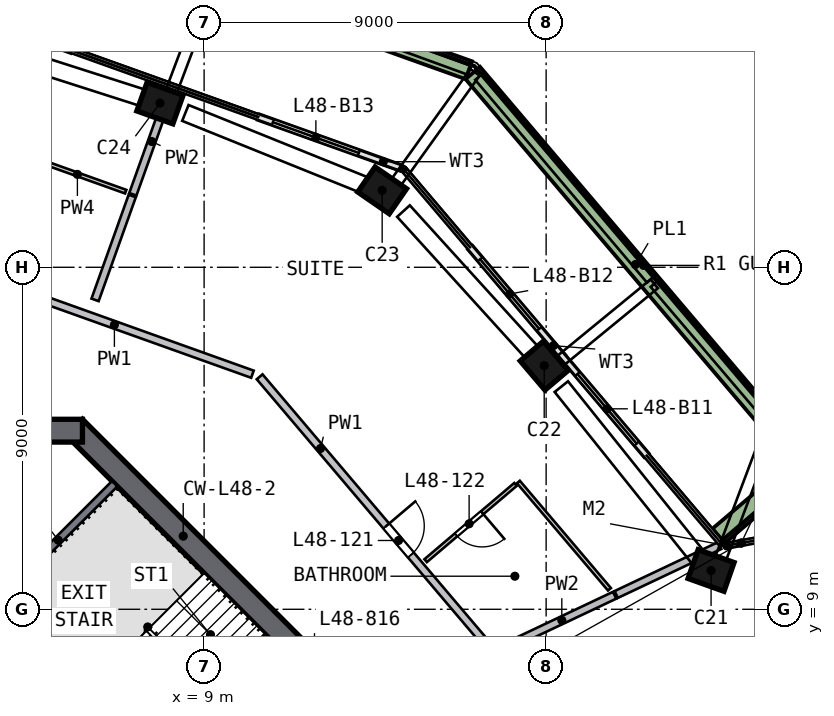
"""IFC4 building model, lengths in metres.
Left out: names, types, materials, properties, quantities, classifications, styles, units other than length and angle.
Written with IfcOpenShell. Run it as: python <this file> out.ifc"""

import sys

from ifc_helpers import new_model, si_unit, direction, frame, frame_2d, origin, origin_2d, place, context, subcontext, project, spatial, rectangle, extrude, element, fill, save


model = new_model("IFC4")
c1 = context("Model", 3, precision=1e-05, world=origin(), true_north=direction((0.0, 1.0)))
c2 = subcontext(c1, "Body", "Model", "MODEL_VIEW")
j1 = project(units=[si_unit("LENGTHUNIT", "METRE"), si_unit("PLANEANGLEUNIT", "RADIAN")], contexts=[c1])
p1 = place(None, origin())
s1 = spatial("IfcSite", under=j1, at=p1, CompositionType="ELEMENT")
p2 = place(p1, origin())
s2 = spatial("IfcBuilding", under=s1, at=p2, CompositionType="ELEMENT")
p3 = place(p2, frame((0.0, 0.0, 197.5)))
s3 = spatial("IfcBuildingStorey", under=s2, at=p3, CompositionType="ELEMENT", Elevation=197.5)
p4 = place(p3, frame((22.398, 9.893, 0.0), z_axis=(-0.047964708, 0.106115266, 0.993196324), x_axis=(0.940870573, -0.329039999, 0.080593079)))
e1 = element("IfcColumn", 1, at=p4, inside=s3, PredefinedType="COLUMN", context=c2, shape_type="SweptSolid", body=[
    extrude(rectangle(XDim=1.0, YDim=0.8, at=origin_2d()), origin(), (0.0, 0.0, 1.0), 3.212),
])
p5 = place(p3, frame((18.038, 15.308, 0.0), z_axis=(-0.073538813, 0.085174219, 0.993648527), x_axis=(-0.642958445, 0.757590083, -0.112524239)))
e2 = element("IfcColumn", 2, at=p5, inside=s3, PredefinedType="COLUMN", context=c2, shape_type="SweptSolid", body=[
    extrude(rectangle(XDim=1.0, YDim=0.8, at=origin_2d()), origin(), (0.0, 0.0, 1.0), 3.21),
])
p6 = place(p3, frame((13.801, 19.946, 0.0), z_axis=(-0.095410014, 0.064772376, 0.99332848), x_axis=(0.817069655, -0.56488901, 0.115315158)))
e3 = element("IfcColumn", 3, at=p6, inside=s3, PredefinedType="COLUMN", context=c2, shape_type="SweptSolid", body=[
    extrude(rectangle(XDim=1.0, YDim=0.8, at=origin_2d()), origin(), (0.0, 0.0, 1.0), 3.211),
])
p7 = place(p3, frame((7.967, 22.276, 0.0), z_axis=(-0.106239847, 0.037035652, 0.99365057), x_axis=(-0.935464206, 0.33503593, -0.112506199)))
e4 = element("IfcColumn", 4, at=p7, inside=s3, PredefinedType="COLUMN", context=c2, shape_type="SweptSolid", body=[
    extrude(rectangle(XDim=1.0, YDim=0.8, at=origin_2d()), origin(), (0.0, 0.0, 1.0), 3.21),
])
p8 = place(p3, frame((13.788, 5.587, 0.0), z_axis=(0.0, 0.0, 1.0), x_axis=(-0.707106781, 0.707106781, 0.0)))
e5 = element("IfcWall", 5, at=p8, inside=s3, PredefinedType="SHEAR", context=c2, shape_type="SweptSolid", body=[
    extrude(rectangle(XDim=11.598, YDim=0.6, at=frame_2d((5.799, 0.0))), origin(), (0.0, 0.0, 1.0), 3.5),
])
p9 = place(p8, frame((2.099, 0.0, 0.0)))
e6 = element("IfcOpeningElement", 6, at=p9, cuts=e5, PredefinedType="OPENING", context=c2, shape_type="SweptSolid", body=[
    extrude(rectangle(XDim=1.2, YDim=2.1, at=frame_2d((0.6, 1.05))), frame((0.0, 0.31, 0.0), z_axis=(0.0, -1.0, 0.0), x_axis=(1.0, 0.0, 0.0)), (0.0, 0.0, 1.0), 0.62),
])
p10 = place(p3, frame((5.799, 13.7, 0.0), z_axis=(0.0, 0.0, 1.0), x_axis=(-1.0, 0.0, 0.0)))
e7 = element("IfcWall", 7, at=p10, inside=s3, PredefinedType="SHEAR", context=c2, shape_type="SweptSolid", body=[
    extrude(rectangle(XDim=11.598, YDim=0.6, at=frame_2d((5.799, 0.0))), origin(), (0.0, 0.0, 1.0), 3.5),
])
p11 = place(p10, frame((4.899, 0.0, 0.0)))
e8 = element("IfcOpeningElement", 8, at=p11, cuts=e7, PredefinedType="OPENING", context=c2, shape_type="SweptSolid", body=[
    extrude(rectangle(XDim=1.8, YDim=2.1, at=frame_2d((0.9, 1.05))), frame((0.0, 0.31, 0.0), z_axis=(0.0, -1.0, 0.0), x_axis=(1.0, 0.0, 0.0)), (0.0, 0.0, 1.0), 0.62),
])
p12 = place(p3, frame((20.638, 13.056, 0.0), z_axis=(0.0, 0.0, 1.0), x_axis=(-0.647052089, 0.762445797, 0.0)))
e9 = element("IfcWall", 9, at=p12, inside=s3, PredefinedType="SOLIDWALL", context=c2, shape_type="SweptSolid", body=[
    extrude(rectangle(XDim=3.4, YDim=0.15, at=frame_2d((1.7, 0.0))), origin(), (0.0, 0.0, 1.0), 2.475),
])
p13 = place(p12, frame((0.4, 0.0, 0.0)))
e10 = element("IfcOpeningElement", 10, at=p13, cuts=e9, PredefinedType="OPENING", context=c2, shape_type="SweptSolid", body=[
    extrude(rectangle(XDim=2.4, YDim=2.4, at=frame_2d((1.2, 1.2))), frame((0.0, 0.085, 0.0), z_axis=(0.0, -1.0, 0.0), x_axis=(1.0, 0.0, 0.0)), (0.0, 0.0, 1.0), 0.17),
])
p14 = place(p3, frame((18.438, 15.648, 0.0), z_axis=(0.0, 0.0, 1.0), x_axis=(-0.647079225, 0.762422768, 0.0)))
e11 = element("IfcWall", 11, at=p14, inside=s3, PredefinedType="SOLIDWALL", context=c2, shape_type="SweptSolid", body=[
    extrude(rectangle(XDim=3.761, YDim=0.15, at=frame_2d((1.881, 0.0))), origin(), (0.0, 0.0, 1.0), 2.475),
])
p15 = place(p14, frame((0.961, 0.0, 0.0)))
e12 = element("IfcOpeningElement", 12, at=p15, cuts=e11, PredefinedType="OPENING", context=c2, shape_type="SweptSolid", body=[
    extrude(rectangle(XDim=2.4, YDim=2.4, at=frame_2d((1.2, 1.2))), frame((0.0, 0.085, 0.0), z_axis=(0.0, -1.0, 0.0), x_axis=(1.0, 0.0, 0.0)), (0.0, 0.0, 1.0), 0.17),
])
p16 = place(p3, frame((14.17, 20.615, 0.0), z_axis=(0.0, 0.0, 1.0), x_axis=(-0.941598422, 0.336737897, 0.0)))
e13 = element("IfcWall", 13, at=p16, inside=s3, PredefinedType="SOLIDWALL", context=c2, shape_type="SweptSolid", body=[
    extrude(rectangle(XDim=3.967, YDim=0.15, at=frame_2d((1.984, 0.0))), origin(), (0.0, 0.0, 1.0), 2.475),
])
p17 = place(p16, frame((1.167, 0.0, 0.0)))
e14 = element("IfcOpeningElement", 14, at=p17, cuts=e13, PredefinedType="OPENING", context=c2, shape_type="SweptSolid", body=[
    extrude(rectangle(XDim=2.4, YDim=2.4, at=frame_2d((1.2, 1.2))), frame((0.0, 0.085, 0.0), z_axis=(0.0, -1.0, 0.0), x_axis=(1.0, 0.0, 0.0)), (0.0, 0.0, 1.0), 0.17),
])
p18 = place(p3, frame((5.516, 23.711, 0.0), z_axis=(0.0, 0.0, 1.0), x_axis=(-0.941585689, 0.336773499, 0.0)))
e15 = element("IfcWall", 15, at=p18, inside=s3, PredefinedType="SOLIDWALL", context=c2, shape_type="SweptSolid", body=[
    extrude(rectangle(XDim=3.609, YDim=0.15, at=frame_2d((1.804, 0.0))), origin(), (0.0, 0.0, 1.0), 2.475),
])
p19 = place(p18, frame((0.4, 0.0, 0.0)))
e16 = element("IfcOpeningElement", 16, at=p19, cuts=e15, PredefinedType="OPENING", context=c2, shape_type="SweptSolid", body=[
    extrude(rectangle(XDim=2.4, YDim=2.4, at=frame_2d((1.2, 1.2))), frame((0.0, 0.085, 0.0), z_axis=(0.0, -1.0, 0.0), x_axis=(1.0, 0.0, 0.0)), (0.0, 0.0, 1.0), 0.17),
])
p20 = place(p3, frame((22.541, 10.932, 0.0), z_axis=(0.0, 0.0, 1.0), x_axis=(0.762447521, 0.647050058, 0.0)))
e17 = element("IfcWall", 17, at=p20, inside=s3, PredefinedType="SOLIDWALL", context=c2, shape_type="SweptSolid", body=[
    extrude(rectangle(XDim=3.199, YDim=0.5, at=frame_2d((1.6, 0.0))), origin(), (0.0, 0.0, 1.0), 0.7),
])
p21 = place(p3, frame((24.627, 13.031, 0.0), z_axis=(0.0, 0.0, 1.0), x_axis=(-0.647062996, 0.762436541, 0.0)))
e18 = element("IfcWall", 18, at=p21, inside=s3, PredefinedType="SOLIDWALL", context=c2, shape_type="SweptSolid", body=[
    extrude(rectangle(XDim=13.223, YDim=0.5, at=frame_2d((6.612, 0.0))), origin(), (0.0, 0.0, 1.0), 0.7),
])
p22 = place(p3, frame((15.964, 23.187, 0.0), z_axis=(0.0, 0.0, 1.0), x_axis=(-0.941588869, 0.33676461, 0.0)))
e19 = element("IfcWall", 19, at=p22, inside=s3, PredefinedType="SOLIDWALL", context=c2, shape_type="SweptSolid", body=[
    extrude(rectangle(XDim=13.723, YDim=0.5, at=frame_2d((6.862, 0.0))), origin(), (0.0, 0.0, 1.0), 0.7),
])
p23 = place(p3, frame((3.24, 9.629, 0.0), z_axis=(0.0, 0.0, 1.0), x_axis=(0.707106781, -0.707106781, 0.0)))
e20 = element("IfcWall", 20, at=p23, inside=s3, PredefinedType="SOLIDWALL", context=c2, shape_type="SweptSolid", body=[
    extrude(rectangle(XDim=9.036, YDim=0.2, at=frame_2d((4.518, 0.0))), origin(), (0.0, 0.0, 1.0), 3.19),
])
p24 = place(p23, frame((7.018, 0.0, 0.0)))
e21 = element("IfcOpeningElement", 21, at=p24, cuts=e20, PredefinedType="OPENING", context=c2, shape_type="SweptSolid", body=[
    extrude(rectangle(XDim=1.2, YDim=2.1, at=frame_2d((0.6, 1.05))), frame((0.0, 0.11, 0.0), z_axis=(0.0, -1.0, 0.0), x_axis=(1.0, 0.0, 0.0)), (0.0, 0.0, 1.0), 0.22),
])
p25 = place(p3, frame((3.677, 9.334, 0.0), z_axis=(0.0, 0.0, 1.0), x_axis=(0.707077716, 0.707135845, 0.0)))
e22 = element("IfcWall", 22, at=p25, inside=s3, PredefinedType="SOLIDWALL", context=c2, shape_type="SweptSolid", body=[
    extrude(rectangle(XDim=4.2, YDim=0.2, at=frame_2d((2.1, 0.0))), origin(), (0.0, 0.0, 1.0), 3.19),
])
p26 = place(p3, frame((1.689, 18.256, 0.0), z_axis=(0.0, 0.0, 1.0), x_axis=(0.941589725, -0.336762215, 0.0)))
e23 = element("IfcWall", 23, at=p26, inside=s3, PredefinedType="SOLIDWALL", context=c2, shape_type="SweptSolid", body=[
    extrude(rectangle(XDim=9.116, YDim=0.2, at=frame_2d((4.558, 0.0))), origin(), (0.0, 0.0, 1.0), 3.19),
])
p27 = place(p26, frame((0.2, 0.0, 0.0)))
e24 = element("IfcOpeningElement", 24, at=p27, cuts=e23, PredefinedType="OPENING", context=c2, shape_type="SweptSolid", body=[
    extrude(rectangle(XDim=1.0, YDim=2.1, at=frame_2d((0.5, 1.05))), frame((0.0, 0.11, 0.0), z_axis=(0.0, -1.0, 0.0), x_axis=(1.0, 0.0, 0.0)), (0.0, 0.0, 1.0), 0.22),
])
p28 = place(p3, frame((10.461, 15.118, 0.0), z_axis=(0.0, 0.0, 1.0), x_axis=(0.647056399, -0.76244214, 0.0)))
e25 = element("IfcWall", 25, at=p28, inside=s3, PredefinedType="SOLIDWALL", context=c2, shape_type="SweptSolid", body=[
    extrude(rectangle(XDim=9.316, YDim=0.2, at=frame_2d((4.658, 0.0))), origin(), (0.0, 0.0, 1.0), 3.19),
])
p29 = place(p28, frame((5.15, 0.0, 0.0)))
e26 = element("IfcOpeningElement", 26, at=p29, cuts=e25, PredefinedType="OPENING", context=c2, shape_type="SweptSolid", body=[
    extrude(rectangle(XDim=1.0, YDim=2.1, at=frame_2d((0.5, 1.05))), frame((0.0, 0.11, 0.0), z_axis=(0.0, -1.0, 0.0), x_axis=(1.0, 0.0, 0.0)), (0.0, 0.0, 1.0), 0.22),
])
p30 = place(p3, frame((6.131, 17.142, 0.0), z_axis=(0.0, 0.0, 1.0), x_axis=(0.336778275, 0.941583981, 0.0)))
e27 = element("IfcWall", 27, at=p30, inside=s3, PredefinedType="SOLIDWALL", context=c2, shape_type="SweptSolid", body=[
    extrude(rectangle(XDim=2.905, YDim=0.2, at=frame_2d((1.452, 0.0))), origin(), (0.0, 0.0, 1.0), 3.19),
])
p31 = place(p3, frame((7.125, 19.92, 0.0), z_axis=(0.0, 0.0, 1.0), x_axis=(0.336744989, 0.941595886, 0.0)))
e28 = element("IfcWall", 28, at=p31, inside=s3, PredefinedType="SOLIDWALL", context=c2, shape_type="SweptSolid", body=[
    extrude(rectangle(XDim=2.952, YDim=0.2, at=frame_2d((1.476, 0.0))), origin(), (0.0, 0.0, 1.0), 3.19),
])
p32 = place(p3, frame((17.023, 8.054, 0.0), z_axis=(0.0, 0.0, 1.0), x_axis=(0.903934995, 0.427669877, 0.0)))
e29 = element("IfcWall", 29, at=p32, inside=s3, PredefinedType="SOLIDWALL", context=c2, shape_type="SweptSolid", body=[
    extrude(rectangle(XDim=3.075, YDim=0.2, at=frame_2d((1.537, 0.0))), origin(), (0.0, 0.0, 1.0), 3.19),
])
p33 = place(p3, frame((19.844, 9.389, 0.0), z_axis=(0.0, 0.0, 1.0), x_axis=(0.90394408, 0.427650675, 0.0)))
e30 = element("IfcWall", 30, at=p33, inside=s3, PredefinedType="SOLIDWALL", context=c2, shape_type="SweptSolid", body=[
    extrude(rectangle(XDim=3.011, YDim=0.2, at=frame_2d((1.506, 0.0))), origin(), (0.0, 0.0, 1.0), 3.19),
])
p34 = place(p3, frame((4.395, 20.899, 0.0), z_axis=(0.0, 0.0, 1.0), x_axis=(0.941567897, -0.336823242, 0.0)))
e31 = element("IfcWall", 31, at=p34, inside=s3, PredefinedType="PARTITIONING", context=c2, shape_type="SweptSolid", body=[
    extrude(rectangle(XDim=2.7, YDim=0.1, at=frame_2d((1.35, 0.0))), origin(), (0.0, 0.0, 1.0), 3.19),
])
p35 = place(p3, frame((17.194, 12.285, 0.0), z_axis=(0.0, 0.0, 1.0), x_axis=(-0.762432611, -0.647067627, 0.0)))
e32 = element("IfcWall", 32, at=p35, inside=s3, PredefinedType="PARTITIONING", context=c2, shape_type="SweptSolid", body=[
    extrude(rectangle(XDim=3.1, YDim=0.1, at=frame_2d((1.55, 0.0))), origin(), (0.0, 0.0, 1.0), 3.19),
])
p36 = place(p35, frame((1.15, 0.0, 0.0)))
e33 = element("IfcOpeningElement", 33, at=p36, cuts=e32, PredefinedType="OPENING", context=c2, shape_type="SweptSolid", body=[
    extrude(rectangle(XDim=0.9, YDim=2.1, at=frame_2d((0.45, 1.05))), frame((0.0, 0.06, 0.0), z_axis=(0.0, -1.0, 0.0), x_axis=(1.0, 0.0, 0.0)), (0.0, 0.0, 1.0), 0.12),
])
p37 = place(p3, frame((17.27, 12.35, 0.0), z_axis=(0.0, 0.0, 1.0), x_axis=(0.647043638, -0.76245297, 0.0)))
e34 = element("IfcWall", 34, at=p37, inside=s3, PredefinedType="PARTITIONING", context=c2, shape_type="SweptSolid", body=[
    extrude(rectangle(XDim=3.704, YDim=0.1, at=frame_2d((1.852, 0.0))), origin(), (0.0, 0.0, 1.0), 3.19),
])
p38 = place(p13, origin())
e35 = element("IfcDoor", 35, at=p38, inside=s3, OperationType="SLIDING_TO_RIGHT", PredefinedType="DOOR", context=c2, shape_type="SweptSolid", body=[
    extrude(rectangle(XDim=2.4, YDim=2.4, at=frame_2d((1.2, 1.2))), frame((0.0, 0.025, 0.0), z_axis=(0.0, -1.0, 0.0), x_axis=(1.0, 0.0, 0.0)), (0.0, 0.0, 1.0), 0.05),
])
fill(e10, e35)
p39 = place(p15, origin())
e36 = element("IfcDoor", 36, at=p39, inside=s3, OperationType="SLIDING_TO_LEFT", PredefinedType="DOOR", context=c2, shape_type="SweptSolid", body=[
    extrude(rectangle(XDim=2.4, YDim=2.4, at=frame_2d((1.2, 1.2))), frame((0.0, 0.025, 0.0), z_axis=(0.0, -1.0, 0.0), x_axis=(1.0, 0.0, 0.0)), (0.0, 0.0, 1.0), 0.05),
])
fill(e12, e36)
p40 = place(p17, origin())
e37 = element("IfcDoor", 37, at=p40, inside=s3, OperationType="SLIDING_TO_LEFT", PredefinedType="DOOR", context=c2, shape_type="SweptSolid", body=[
    extrude(rectangle(XDim=2.4, YDim=2.4, at=frame_2d((1.2, 1.2))), frame((0.0, 0.025, 0.0), z_axis=(0.0, -1.0, 0.0), x_axis=(1.0, 0.0, 0.0)), (0.0, 0.0, 1.0), 0.05),
])
fill(e14, e37)
p41 = place(p29, origin())
e38 = element("IfcDoor", 38, at=p41, inside=s3, OperationType="SINGLE_SWING_LEFT", PredefinedType="DOOR", context=c2, shape_type="SweptSolid", body=[
    extrude(rectangle(XDim=1.0, YDim=2.1, at=frame_2d((0.5, 1.05))), frame((0.0, 0.025, 0.0), z_axis=(0.0, -1.0, 0.0), x_axis=(1.0, 0.0, 0.0)), (0.0, 0.0, 1.0), 0.05),
])
fill(e26, e38)
p42 = place(p36, origin())
e39 = element("IfcDoor", 39, at=p42, inside=s3, OperationType="SINGLE_SWING_LEFT", PredefinedType="DOOR", context=c2, shape_type="SweptSolid", body=[
    extrude(rectangle(XDim=0.9, YDim=2.1, at=frame_2d((0.45, 1.05))), frame((0.0, 0.025, 0.0), z_axis=(0.0, -1.0, 0.0), x_axis=(1.0, 0.0, 0.0)), (0.0, 0.0, 1.0), 0.05),
])
fill(e33, e39)
save(model, sys.argv[1])
